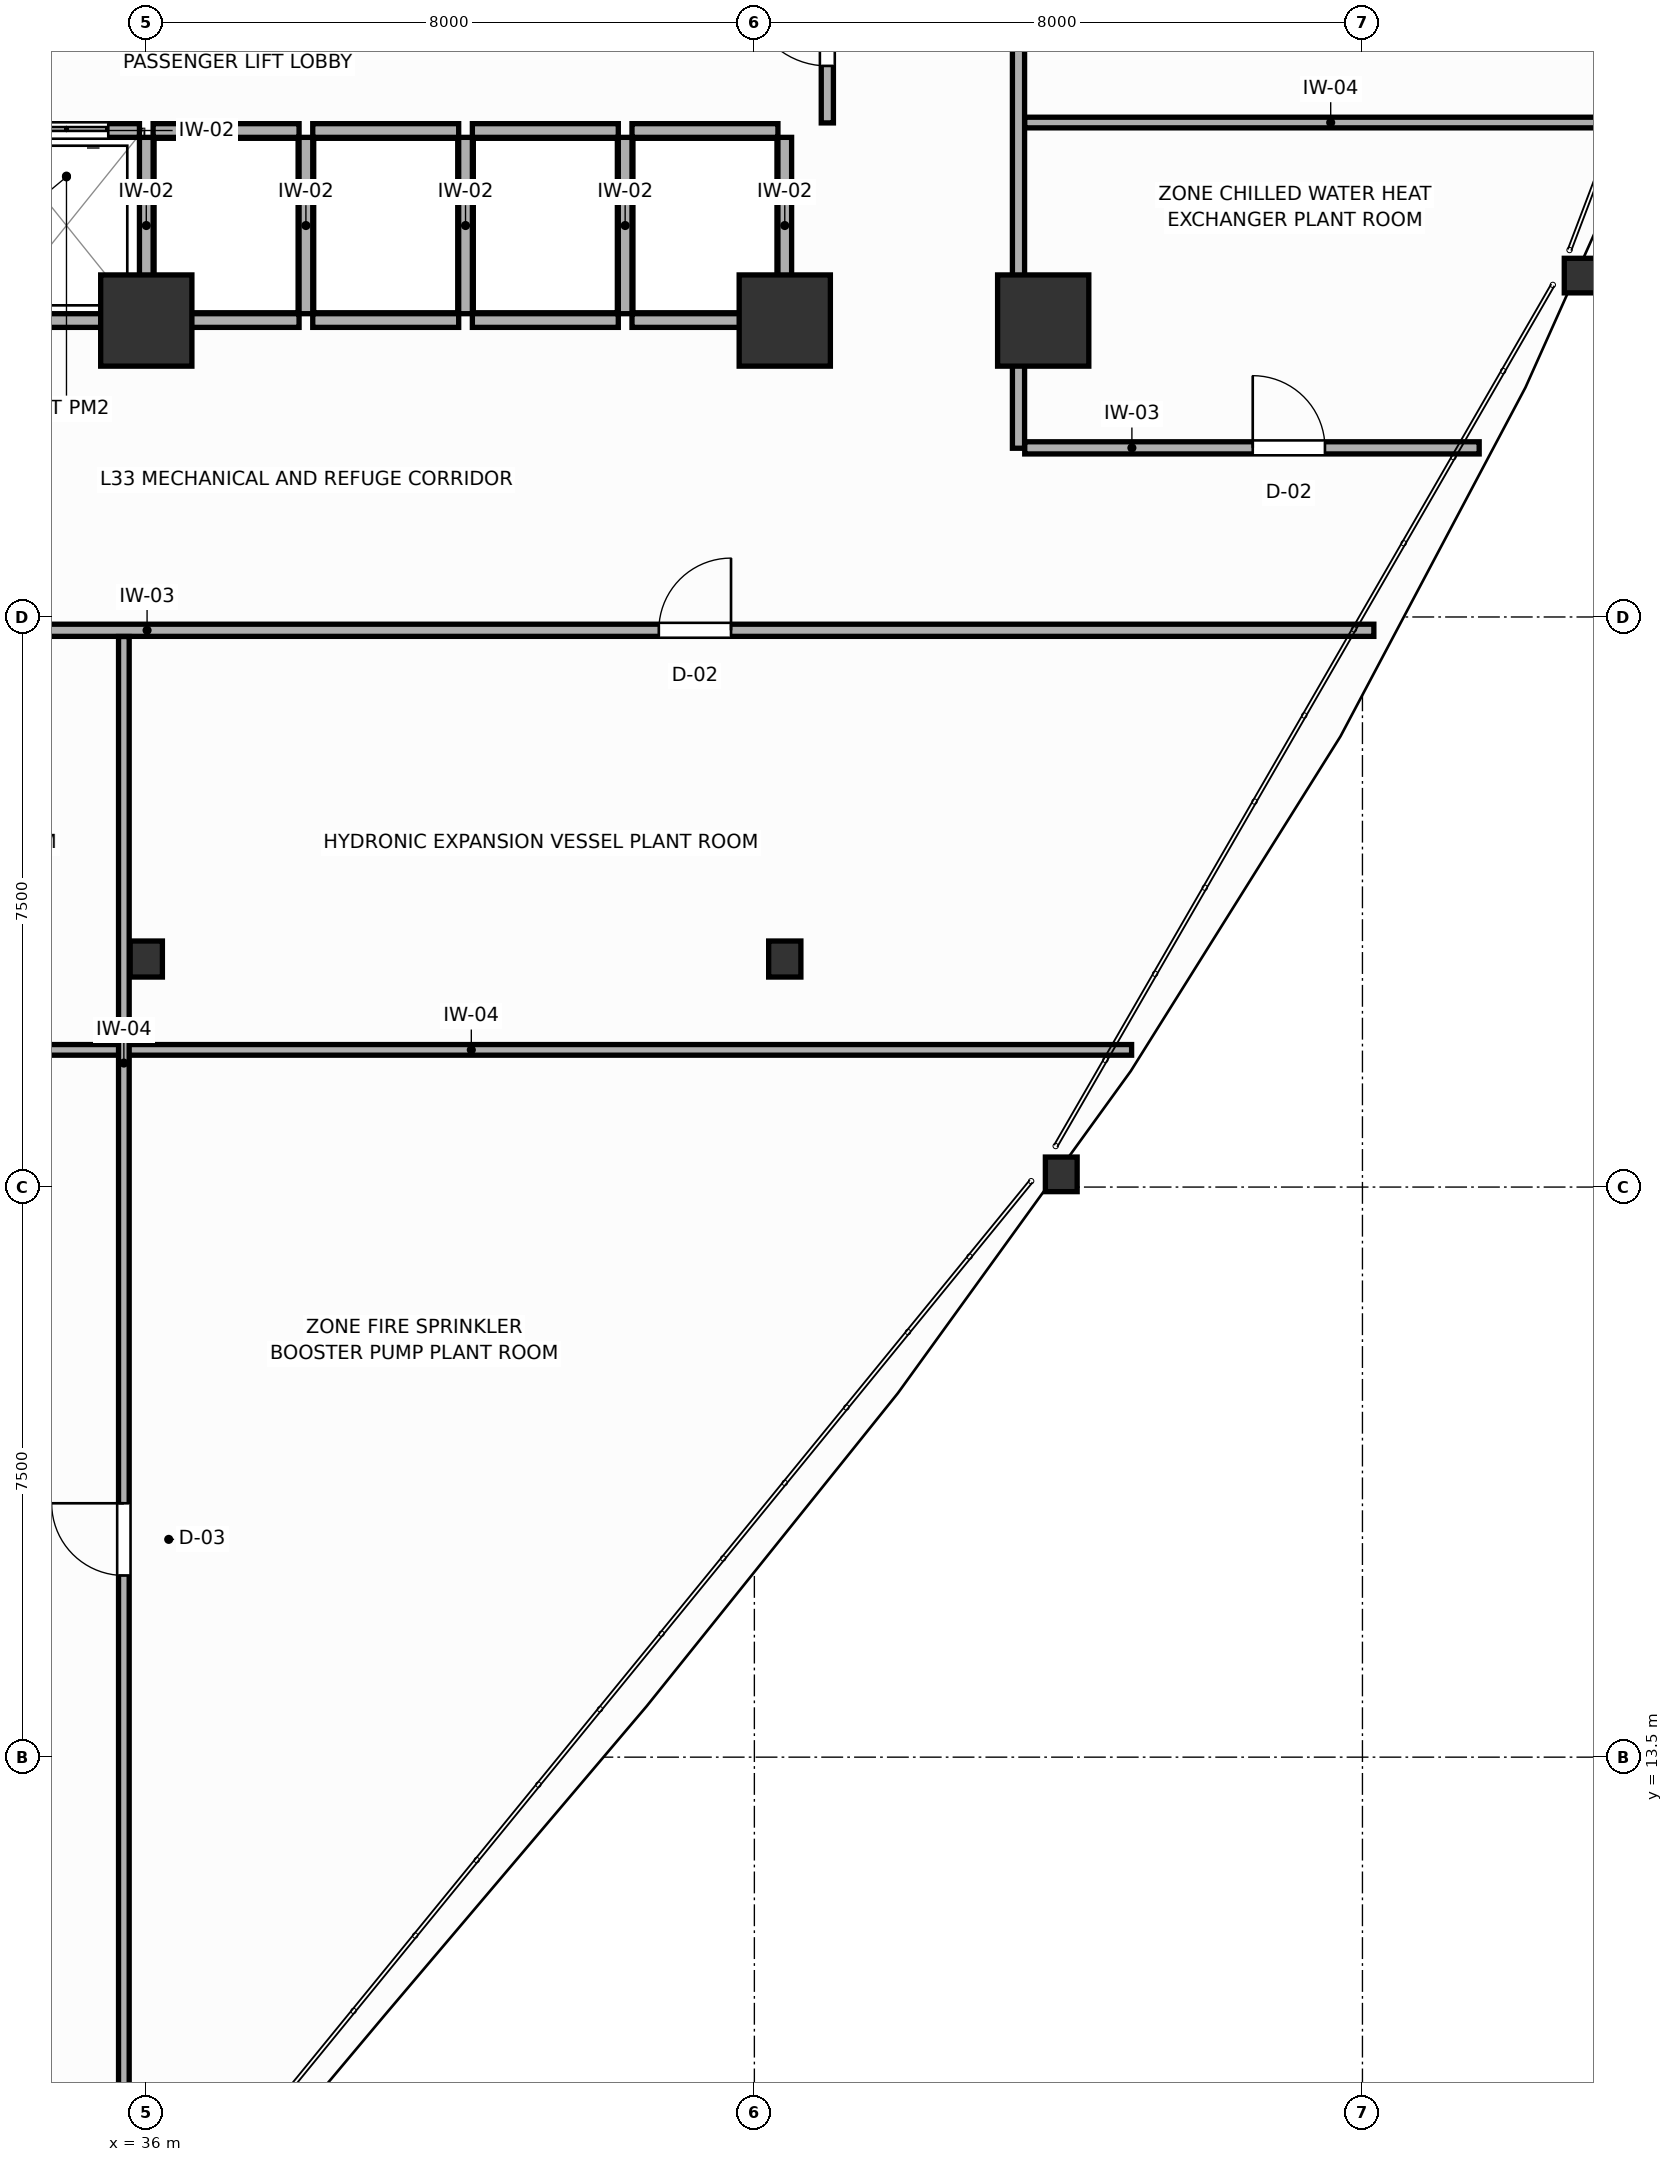
"""IFC4 building model, lengths in metres.
Left out: names, types, materials, properties, quantities, classifications, styles, units other than length and angle.
Written with IfcOpenShell. Run it as: python <this file> out.ifc"""

import sys

from ifc_helpers import new_model, si_unit, direction, frame, frame_2d, origin, origin_2d, place, context, subcontext, project, spatial, rectangle, i_section, extrude, source, transform, mapped, element, fill, save


model = new_model("IFC4")
c1 = context("Model", 3, precision=1e-05, world=origin(), true_north=direction((0.0, 1.0)))
c2 = subcontext(c1, "Body", "Model", "MODEL_VIEW")
j1 = project(units=[si_unit("LENGTHUNIT", "METRE"), si_unit("PLANEANGLEUNIT", "RADIAN")], contexts=[c1])
p1 = place(None, origin())
s1 = spatial("IfcSite", under=j1, at=p1, CompositionType="ELEMENT")
p2 = place(p1, origin())
s2 = spatial("IfcBuilding", under=s1, at=p2, CompositionType="ELEMENT")
p3 = place(p2, frame((0.0, 0.0, 131.4)))
s3 = spatial("IfcBuildingStorey", under=s2, at=p3, CompositionType="ELEMENT", Elevation=131.4)
m1 = source(origin(), c2, "Body", "SweptSolid", [
    extrude(rectangle(XDim=1.2, YDim=1.2, at=origin_2d()), origin(), (0.0, 0.0, 1.0), 4.8),
])
for number, where, z_axis, x_axis in (
    (1, (44.4, 32.4, 0.0), (0.0, 0.0, 1.0), (1.0, 0.0, 0.0)),
    (2, (36.0, 32.4, 0.0), (0.0, 0.0, 1.0), (1.0, 0.0, 0.0)),
    (3, (47.8, 32.4, 0.0), (0.0, 0.0, 1.0), (1.0, 0.0, 0.0)),
):
    element("IfcColumn", number, at=place(p3, frame(where, z_axis=z_axis, x_axis=x_axis)), inside=s3, PredefinedType="COLUMN", context=c2, shape_type="MappedRepresentation", body=[
        mapped(m1, transform((0.0, 0.0, 0.0), scale=1.0)),
    ])
m2 = source(origin(), c2, "Body", "SweptSolid", [
    extrude(i_section(OverallWidth=0.424, OverallDepth=0.474, WebThickness=0.045, FlangeThickness=0.072, FilletRadius=0.015, at=origin_2d()), origin(), (0.0, 0.0, 1.0), 4.8),
])
for number, where, z_axis, x_axis in (
    (4, (44.4, 24.0, 0.0), (0.0, 0.0, 1.0), (1.0, 0.0, 0.0)),
    (5, (36.0, 24.0, 0.0), (0.0, 0.0, 1.0), (1.0, 0.0, 0.0)),
):
    element("IfcColumn", number, at=place(p3, frame(where, z_axis=z_axis, x_axis=x_axis)), inside=s3, PredefinedType="COLUMN", context=c2, shape_type="MappedRepresentation", body=[
        mapped(m2, transform((0.0, 0.0, 0.0), scale=1.0)),
    ])
m3 = source(origin(), c2, "Body", "SweptSolid", [
    extrude(i_section(OverallWidth=0.418, OverallDepth=0.455, WebThickness=0.039, FlangeThickness=0.063, FilletRadius=0.015, at=origin_2d()), origin(), (0.0, 0.0, 1.0), 4.8),
])
for number, where, z_axis, x_axis in (
    (6, (48.038, 21.167, 0.0), (0.0, 0.0, 1.0), (1.0, 0.0, 0.0)),
    (7, (54.864, 32.991, 0.0), (0.0, 0.0, 1.0), (1.0, 0.0, 0.0)),
):
    element("IfcColumn", number, at=place(p3, frame(where, z_axis=z_axis, x_axis=x_axis)), inside=s3, PredefinedType="COLUMN", context=c2, shape_type="MappedRepresentation", body=[
        mapped(m3, transform((0.0, 0.0, 0.0), scale=1.0)),
    ])
p4 = place(p3, frame((33.99, 34.9, 0.0), z_axis=(0.0, 0.0, 1.0), x_axis=(1.0, 0.0, 0.0)))
e8 = element("IfcWall", 8, at=p4, inside=s3, PredefinedType="PARTITIONING", context=c2, shape_type="SweptSolid", body=[
    extrude(rectangle(XDim=1.92, YDim=0.18, at=frame_2d((0.96, 0.0))), origin(), (0.0, 0.0, 1.0), 4.6),
])
p5 = place(p4, frame((0.41, 0.0, 0.0)))
e9 = element("IfcOpeningElement", 9, at=p5, cuts=e8, PredefinedType="OPENING", context=c2, shape_type="SweptSolid", body=[
    extrude(rectangle(XDim=1.1, YDim=2.1, at=frame_2d((0.55, 1.05))), frame((0.0, 0.1, 0.0), z_axis=(0.0, -1.0, 0.0), x_axis=(1.0, 0.0, 0.0)), (0.0, 0.0, 1.0), 0.2),
])
p6 = place(p3, frame((33.99, 32.4, 0.0), z_axis=(0.0, 0.0, 1.0), x_axis=(1.0, 0.0, 0.0)))
e10 = element("IfcWall", 10, at=p6, inside=s3, PredefinedType="PARTITIONING", context=c2, shape_type="SweptSolid", body=[
    extrude(rectangle(XDim=1.92, YDim=0.18, at=frame_2d((0.96, 0.0))), origin(), (0.0, 0.0, 1.0), 2.57),
])
p7 = place(p3, frame((36.09, 34.9, 0.0), z_axis=(0.0, 0.0, 1.0), x_axis=(1.0, 0.0, 0.0)))
e11 = element("IfcWall", 11, at=p7, inside=s3, PredefinedType="PARTITIONING", context=c2, shape_type="SweptSolid", body=[
    extrude(rectangle(XDim=1.92, YDim=0.18, at=frame_2d((0.96, 0.0))), origin(), (0.0, 0.0, 1.0), 4.6),
])
p8 = place(p3, frame((36.09, 32.4, 0.0), z_axis=(0.0, 0.0, 1.0), x_axis=(1.0, 0.0, 0.0)))
e12 = element("IfcWall", 12, at=p8, inside=s3, PredefinedType="PARTITIONING", context=c2, shape_type="SweptSolid", body=[
    extrude(rectangle(XDim=1.92, YDim=0.18, at=frame_2d((0.96, 0.0))), origin(), (0.0, 0.0, 1.0), 2.57),
])
p9 = place(p3, frame((36.0, 32.49, 0.0), z_axis=(0.0, 0.0, 1.0), x_axis=(0.0, 1.0, 0.0)))
e13 = element("IfcWall", 13, at=p9, inside=s3, PredefinedType="PARTITIONING", context=c2, shape_type="SweptSolid", body=[
    extrude(rectangle(XDim=2.32, YDim=0.18, at=frame_2d((1.16, 0.0))), origin(), (0.0, 0.0, 1.0), 4.6),
])
p10 = place(p3, frame((38.19, 34.9, 0.0), z_axis=(0.0, 0.0, 1.0), x_axis=(1.0, 0.0, 0.0)))
e14 = element("IfcWall", 14, at=p10, inside=s3, PredefinedType="PARTITIONING", context=c2, shape_type="SweptSolid", body=[
    extrude(rectangle(XDim=1.92, YDim=0.18, at=frame_2d((0.96, 0.0))), origin(), (0.0, 0.0, 1.0), 4.6),
])
p11 = place(p3, frame((38.19, 32.4, 0.0), z_axis=(0.0, 0.0, 1.0), x_axis=(1.0, 0.0, 0.0)))
e15 = element("IfcWall", 15, at=p11, inside=s3, PredefinedType="PARTITIONING", context=c2, shape_type="SweptSolid", body=[
    extrude(rectangle(XDim=1.92, YDim=0.18, at=frame_2d((0.96, 0.0))), origin(), (0.0, 0.0, 1.0), 2.57),
])
p12 = place(p3, frame((38.1, 32.49, 0.0), z_axis=(0.0, 0.0, 1.0), x_axis=(0.0, 1.0, 0.0)))
e16 = element("IfcWall", 16, at=p12, inside=s3, PredefinedType="PARTITIONING", context=c2, shape_type="SweptSolid", body=[
    extrude(rectangle(XDim=2.32, YDim=0.18, at=frame_2d((1.16, 0.0))), origin(), (0.0, 0.0, 1.0), 4.6),
])
p13 = place(p3, frame((40.29, 34.9, 0.0), z_axis=(0.0, 0.0, 1.0), x_axis=(1.0, 0.0, 0.0)))
e17 = element("IfcWall", 17, at=p13, inside=s3, PredefinedType="PARTITIONING", context=c2, shape_type="SweptSolid", body=[
    extrude(rectangle(XDim=1.92, YDim=0.18, at=frame_2d((0.96, 0.0))), origin(), (0.0, 0.0, 1.0), 4.6),
])
p14 = place(p3, frame((40.29, 32.4, 0.0), z_axis=(0.0, 0.0, 1.0), x_axis=(1.0, 0.0, 0.0)))
e18 = element("IfcWall", 18, at=p14, inside=s3, PredefinedType="PARTITIONING", context=c2, shape_type="SweptSolid", body=[
    extrude(rectangle(XDim=1.92, YDim=0.18, at=frame_2d((0.96, 0.0))), origin(), (0.0, 0.0, 1.0), 2.57),
])
p15 = place(p3, frame((40.2, 32.49, 0.0), z_axis=(0.0, 0.0, 1.0), x_axis=(0.0, 1.0, 0.0)))
e19 = element("IfcWall", 19, at=p15, inside=s3, PredefinedType="PARTITIONING", context=c2, shape_type="SweptSolid", body=[
    extrude(rectangle(XDim=2.32, YDim=0.18, at=frame_2d((1.16, 0.0))), origin(), (0.0, 0.0, 1.0), 4.6),
])
p16 = place(p3, frame((42.39, 34.9, 0.0), z_axis=(0.0, 0.0, 1.0), x_axis=(1.0, 0.0, 0.0)))
e20 = element("IfcWall", 20, at=p16, inside=s3, PredefinedType="PARTITIONING", context=c2, shape_type="SweptSolid", body=[
    extrude(rectangle(XDim=1.92, YDim=0.18, at=frame_2d((0.96, 0.0))), origin(), (0.0, 0.0, 1.0), 4.6),
])
p17 = place(p3, frame((42.39, 32.4, 0.0), z_axis=(0.0, 0.0, 1.0), x_axis=(1.0, 0.0, 0.0)))
e21 = element("IfcWall", 21, at=p17, inside=s3, PredefinedType="PARTITIONING", context=c2, shape_type="SweptSolid", body=[
    extrude(rectangle(XDim=1.92, YDim=0.18, at=frame_2d((0.96, 0.0))), origin(), (0.0, 0.0, 1.0), 2.57),
])
for number, where, z_axis, x_axis in (
    (22, (42.3, 32.49, 0.0), (0.0, 0.0, 1.0), (0.0, 1.0, 0.0)),
    (23, (44.4, 32.49, 0.0), (0.0, 0.0, 1.0), (0.0, 1.0, 0.0)),
):
    element("IfcWall", number, at=place(p3, frame(where, z_axis=z_axis, x_axis=x_axis)), inside=s3, PredefinedType="PARTITIONING", context=c2, shape_type="SweptSolid", body=[
        extrude(rectangle(XDim=2.32, YDim=0.18, at=frame_2d((1.16, 0.0))), origin(), (0.0, 0.0, 1.0), 4.6),
    ])
p18 = place(p3, frame((44.96, 35.0, 0.0), z_axis=(0.0, 0.0, 1.0), x_axis=(0.0, 1.0, 0.0)))
e24 = element("IfcWall", 24, at=p18, inside=s3, PredefinedType="PARTITIONING", context=c2, shape_type="SweptSolid", body=[
    extrude(rectangle(XDim=2.65, YDim=0.16, at=frame_2d((1.325, 0.0))), origin(), (0.0, 0.0, 1.0), 4.6),
])
p19 = place(p18, frame((0.75, 0.0, 0.0)))
e25 = element("IfcOpeningElement", 25, at=p19, cuts=e24, PredefinedType="OPENING", context=c2, shape_type="SweptSolid", body=[
    extrude(rectangle(XDim=1.05, YDim=2.1, at=frame_2d((0.525, 1.05))), frame((0.0, 0.09, 0.0), z_axis=(0.0, -1.0, 0.0), x_axis=(1.0, 0.0, 0.0)), (0.0, 0.0, 1.0), 0.18),
])
p20 = place(p3, frame((19.85, 28.325, 0.0), z_axis=(0.0, 0.0, 1.0), x_axis=(1.0, 0.0, 0.0)))
e26 = element("IfcWall", 26, at=p20, inside=s3, PredefinedType="PARTITIONING", context=c2, shape_type="SweptSolid", body=[
    extrude(rectangle(XDim=32.3, YDim=0.16, at=frame_2d((16.15, 0.0))), origin(), (0.0, 0.0, 1.0), 4.6),
])
p21 = place(p20, frame((8.478, 0.0, 0.0)))
e27 = element("IfcOpeningElement", 27, at=p21, cuts=e26, PredefinedType="OPENING", context=c2, shape_type="SweptSolid", body=[
    extrude(rectangle(XDim=0.95, YDim=2.05, at=frame_2d((0.475, 1.025))), frame((0.0, 0.09, 0.0), z_axis=(0.0, -1.0, 0.0), x_axis=(1.0, 0.0, 0.0)), (0.0, 0.0, 1.0), 0.18),
])
p22 = place(p20, frame((22.893, 0.0, 0.0)))
e28 = element("IfcOpeningElement", 28, at=p22, cuts=e26, PredefinedType="OPENING", context=c2, shape_type="SweptSolid", body=[
    extrude(rectangle(XDim=0.95, YDim=2.05, at=frame_2d((0.475, 1.025))), frame((0.0, 0.09, 0.0), z_axis=(0.0, -1.0, 0.0), x_axis=(1.0, 0.0, 0.0)), (0.0, 0.0, 1.0), 0.18),
])
p23 = place(p3, frame((47.475, 30.72, 0.0), z_axis=(0.0, 0.0, 1.0), x_axis=(0.0, 1.0, 0.0)))
e29 = element("IfcWall", 29, at=p23, inside=s3, PredefinedType="PARTITIONING", context=c2, shape_type="SweptSolid", body=[
    extrude(rectangle(XDim=18.463, YDim=0.16, at=frame_2d((9.231, 0.0))), origin(), (0.0, 0.0, 1.0), 4.6),
])
p24 = place(p23, frame((10.734, 0.0, 0.0)))
e30 = element("IfcOpeningElement", 30, at=p24, cuts=e29, PredefinedType="OPENING", context=c2, shape_type="SweptSolid", body=[
    extrude(rectangle(XDim=0.95, YDim=2.05, at=frame_2d((0.475, 1.025))), frame((0.0, 0.09, 0.0), z_axis=(0.0, -1.0, 0.0), x_axis=(1.0, 0.0, 0.0)), (0.0, 0.0, 1.0), 0.18),
])
p25 = place(p3, frame((47.557, 30.725, 0.0), z_axis=(0.0, 0.0, 1.0), x_axis=(1.0, 0.0, 0.0)))
e31 = element("IfcWall", 31, at=p25, inside=s3, PredefinedType="PARTITIONING", context=c2, shape_type="SweptSolid", body=[
    extrude(rectangle(XDim=5.979, YDim=0.16, at=frame_2d((2.989, 0.0))), origin(), (0.0, 0.0, 1.0), 4.6),
])
p26 = place(p25, frame((3.0, 0.0, 0.0)))
e32 = element("IfcOpeningElement", 32, at=p26, cuts=e31, PredefinedType="OPENING", context=c2, shape_type="SweptSolid", body=[
    extrude(rectangle(XDim=0.95, YDim=2.05, at=frame_2d((0.475, 1.025))), frame((0.0, 0.09, 0.0), z_axis=(0.0, -1.0, 0.0), x_axis=(1.0, 0.0, 0.0)), (0.0, 0.0, 1.0), 0.18),
])
p27 = place(p3, frame((23.037, 22.805, 0.0), z_axis=(0.0, 0.0, 1.0), x_axis=(1.0, 0.0, 0.0)))
e33 = element("IfcWall", 33, at=p27, inside=s3, PredefinedType="PARTITIONING", context=c2, shape_type="SweptSolid", body=[
    extrude(rectangle(XDim=25.926, YDim=0.14, at=frame_2d((12.963, 0.0))), origin(), (0.0, 0.0, 1.0), 4.6),
])
p28 = place(p27, frame((7.422, 0.0, 0.0)))
e34 = element("IfcOpeningElement", 34, at=p28, cuts=e33, PredefinedType="OPENING", context=c2, shape_type="SweptSolid", body=[
    extrude(rectangle(XDim=0.95, YDim=2.05, at=frame_2d((0.475, 1.025))), frame((0.0, 0.08, 0.0), z_axis=(0.0, -1.0, 0.0), x_axis=(1.0, 0.0, 0.0)), (0.0, 0.0, 1.0), 0.16),
])
p29 = place(p3, frame((35.705, 8.783, 0.0), z_axis=(0.0, 0.0, 1.0), x_axis=(0.0, 1.0, 0.0)))
e35 = element("IfcWall", 35, at=p29, inside=s3, PredefinedType="PARTITIONING", context=c2, shape_type="SweptSolid", body=[
    extrude(rectangle(XDim=19.46, YDim=0.14, at=frame_2d((9.73, 0.0))), origin(), (0.0, 0.0, 1.0), 2.57),
])
p30 = place(p29, frame((7.107, 0.0, 0.0)))
e36 = element("IfcOpeningElement", 36, at=p30, cuts=e35, PredefinedType="OPENING", context=c2, shape_type="SweptSolid", body=[
    extrude(rectangle(XDim=0.95, YDim=2.05, at=frame_2d((0.475, 1.025))), frame((0.0, 0.08, 0.0), z_axis=(0.0, -1.0, 0.0), x_axis=(1.0, 0.0, 0.0)), (0.0, 0.0, 1.0), 0.16),
])
p31 = place(p3, frame((47.557, 35.005, 0.0), z_axis=(0.0, 0.0, 1.0), x_axis=(1.0, 0.0, 0.0)))
e37 = element("IfcWall", 37, at=p31, inside=s3, PredefinedType="PARTITIONING", context=c2, shape_type="SweptSolid", body=[
    extrude(rectangle(XDim=8.051, YDim=0.14, at=frame_2d((4.025, 0.0))), origin(), (0.0, 0.0, 1.0), 4.6),
])
p32 = place(p5, origin())
e38 = element("IfcDoor", 38, at=p32, inside=s3, OperationType="DOUBLE_DOOR_SLIDING", PredefinedType="DOOR", context=c2, shape_type="SweptSolid", body=[
    extrude(rectangle(XDim=1.1, YDim=2.1, at=frame_2d((0.55, 1.05))), frame((0.0, 0.025, 0.0), z_axis=(0.0, -1.0, 0.0), x_axis=(1.0, 0.0, 0.0)), (0.0, 0.0, 1.0), 0.05),
])
fill(e9, e38)
p33 = place(p19, origin())
e39 = element("IfcDoor", 39, at=p33, inside=s3, OperationType="SINGLE_SWING_RIGHT", PredefinedType="DOOR", context=c2, shape_type="SweptSolid", body=[
    extrude(rectangle(XDim=1.05, YDim=2.1, at=frame_2d((0.525, 1.05))), frame((0.0, 0.025, 0.0), z_axis=(0.0, -1.0, 0.0), x_axis=(1.0, 0.0, 0.0)), (0.0, 0.0, 1.0), 0.05),
])
fill(e25, e39)
p34 = place(p22, origin())
e40 = element("IfcDoor", 40, at=p34, inside=s3, OperationType="SINGLE_SWING_RIGHT", PredefinedType="DOOR", context=c2, shape_type="SweptSolid", body=[
    extrude(rectangle(XDim=0.95, YDim=2.05, at=frame_2d((0.475, 1.025))), frame((0.0, 0.025, 0.0), z_axis=(0.0, -1.0, 0.0), x_axis=(1.0, 0.0, 0.0)), (0.0, 0.0, 1.0), 0.05),
])
fill(e28, e40)
p35 = place(p26, origin())
e41 = element("IfcDoor", 41, at=p35, inside=s3, OperationType="SINGLE_SWING_LEFT", PredefinedType="DOOR", context=c2, shape_type="SweptSolid", body=[
    extrude(rectangle(XDim=0.95, YDim=2.05, at=frame_2d((0.475, 1.025))), frame((0.0, 0.025, 0.0), z_axis=(0.0, -1.0, 0.0), x_axis=(1.0, 0.0, 0.0)), (0.0, 0.0, 1.0), 0.05),
])
fill(e32, e41)
p36 = place(p30, origin())
e42 = element("IfcDoor", 42, at=p36, inside=s3, OperationType="SINGLE_SWING_RIGHT", PredefinedType="DOOR", context=c2, shape_type="SweptSolid", body=[
    extrude(rectangle(XDim=0.95, YDim=2.05, at=frame_2d((0.475, 1.025))), frame((0.0, 0.025, 0.0), z_axis=(0.0, -1.0, 0.0), x_axis=(1.0, 0.0, 0.0)), (0.0, 0.0, 1.0), 0.05),
])
fill(e36, e42)
save(model, sys.argv[1])
